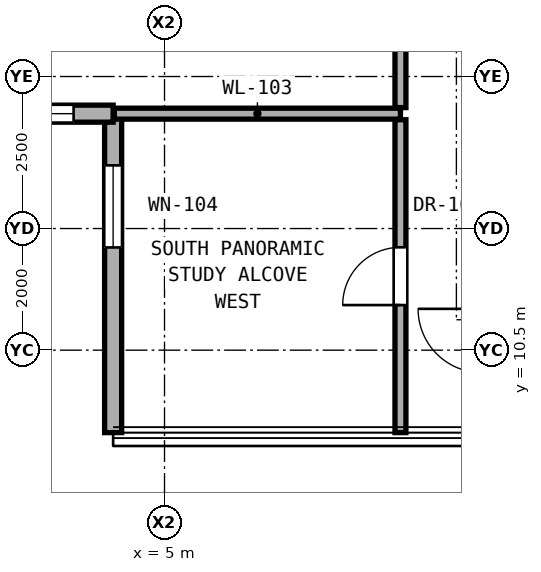
"""IFC4 building model, lengths in metres.
Left out: names, types, materials, properties, quantities, classifications, styles, units other than length and angle.
Written with IfcOpenShell. Run it as: python <this file> out.ifc"""

import sys

from ifc_helpers import new_model, si_unit, direction, frame, frame_2d, origin, place, context, subcontext, project, spatial, rectangle, extrude, element, fill, save


model = new_model("IFC4")
c1 = context("Model", 3, precision=1e-05, world=origin(), true_north=direction((0.0, 1.0)))
c2 = subcontext(c1, "Body", "Model", "MODEL_VIEW")
j1 = project(units=[si_unit("LENGTHUNIT", "METRE"), si_unit("PLANEANGLEUNIT", "RADIAN")], contexts=[c1])
p1 = place(None, origin())
s1 = spatial("IfcSite", under=j1, at=p1, CompositionType="ELEMENT")
p2 = place(p1, origin())
s2 = spatial("IfcBuilding", under=s1, at=p2, CompositionType="ELEMENT")
p3 = place(p2, frame((0.0, 0.0, 177.15)))
s3 = spatial("IfcBuildingStorey", under=s2, at=p3, CompositionType="ELEMENT", Elevation=177.15)
p4 = place(p3, frame((4.155, 14.389, 0.0), z_axis=(0.0, 0.0, 1.0), x_axis=(0.0, -1.0, 0.0)))
e1 = element("IfcWall", 1, at=p4, inside=s3, PredefinedType="SOLIDWALL", context=c2, shape_type="SweptSolid", body=[
    extrude(rectangle(XDim=5.245, YDim=0.28, at=frame_2d((2.623, 0.0))), origin(), (0.0, 0.0, 1.0), 3.03),
])
p5 = place(p4, frame((0.85, 0.0, 0.68)))
e2 = element("IfcOpeningElement", 2, at=p5, cuts=e1, PredefinedType="OPENING", context=c2, shape_type="SweptSolid", body=[
    extrude(rectangle(XDim=1.35, YDim=2.2, at=frame_2d((0.675, 1.1))), frame((0.0, 0.15, 0.0), z_axis=(0.0, -1.0, 0.0), x_axis=(1.0, 0.0, 0.0)), (0.0, 0.0, 1.0), 0.3),
])
p6 = place(p3, frame((-1.09, 14.389, 0.0), z_axis=(0.0, 0.0, 1.0), x_axis=(1.0, 0.0, 0.0)))
e3 = element("IfcWall", 3, at=p6, inside=s3, PredefinedType="SOLIDWALL", context=c2, shape_type="SweptSolid", body=[
    extrude(rectangle(XDim=5.245, YDim=0.28, at=frame_2d((2.623, 0.0))), origin(), (0.0, 0.0, 1.0), 3.03),
])
p7 = place(p6, frame((3.495, 0.0, 0.85)))
e4 = element("IfcOpeningElement", 4, at=p7, cuts=e3, PredefinedType="OPENING", context=c2, shape_type="SweptSolid", body=[
    extrude(rectangle(XDim=1.1, YDim=2.0, at=frame_2d((0.55, 1.0))), frame((0.0, 0.15, 0.0), z_axis=(0.0, -1.0, 0.0), x_axis=(1.0, 0.0, 0.0)), (0.0, 0.0, 1.0), 0.3),
])
p8 = place(p3, frame((4.175, 14.389, 0.0), z_axis=(0.0, 0.0, 1.0), x_axis=(1.0, 0.0, 0.0)))
e5 = element("IfcWall", 5, at=p8, inside=s3, PredefinedType="PARTITIONING", context=c2, shape_type="SweptSolid", body=[
    extrude(rectangle(XDim=4.705, YDim=0.18, at=frame_2d((2.353, 0.0))), origin(), (0.0, 0.0, 1.0), 3.05),
])
p9 = place(p3, frame((8.88, 9.144, 0.0), z_axis=(0.0, 0.0, 1.0), x_axis=(0.0, 1.0, 0.0)))
e6 = element("IfcWall", 6, at=p9, inside=s3, PredefinedType="PARTITIONING", context=c2, shape_type="SweptSolid", body=[
    extrude(rectangle(XDim=5.145, YDim=0.18, at=frame_2d((2.573, 0.0))), origin(), (0.0, 0.0, 1.0), 3.05),
])
p10 = place(p9, frame((2.097, 0.0, 0.0)))
e7 = element("IfcOpeningElement", 7, at=p10, cuts=e6, PredefinedType="OPENING", context=c2, shape_type="SweptSolid", body=[
    extrude(rectangle(XDim=0.95, YDim=2.15, at=frame_2d((0.475, 1.075))), frame((0.0, 0.1, 0.0), z_axis=(0.0, -1.0, 0.0), x_axis=(1.0, 0.0, 0.0)), (0.0, 0.0, 1.0), 0.2),
])
p11 = place(p3, frame((8.88, 14.489, 0.0), z_axis=(0.0, 0.0, 1.0), x_axis=(0.0, 1.0, 0.0)))
e8 = element("IfcWall", 8, at=p11, inside=s3, PredefinedType="PARTITIONING", context=c2, shape_type="SweptSolid", body=[
    extrude(rectangle(XDim=4.636, YDim=0.18, at=frame_2d((2.318, 0.0))), origin(), (0.0, 0.0, 1.0), 2.442),
])
p12 = place(p11, frame((2.093, 0.0, 0.0)))
e9 = element("IfcOpeningElement", 9, at=p12, cuts=e8, PredefinedType="OPENING", context=c2, shape_type="SweptSolid", body=[
    extrude(rectangle(XDim=1.05, YDim=2.2, at=frame_2d((0.525, 1.1))), frame((0.0, 0.1, 0.0), z_axis=(0.0, -1.0, 0.0), x_axis=(1.0, 0.0, 0.0)), (0.0, 0.0, 1.0), 0.2),
])
p13 = place(p5, origin())
e10 = element("IfcWindow", 10, at=p13, inside=s3, PartitioningType="SINGLE_PANEL", PredefinedType="WINDOW", context=c2, shape_type="SweptSolid", body=[
    extrude(rectangle(XDim=1.35, YDim=2.2, at=frame_2d((0.675, 1.1))), frame((0.0, 0.03, 0.0), z_axis=(0.0, -1.0, 0.0), x_axis=(1.0, 0.0, 0.0)), (0.0, 0.0, 1.0), 0.06),
])
fill(e2, e10)
p14 = place(p7, origin())
e11 = element("IfcWindow", 11, at=p14, inside=s3, PartitioningType="SINGLE_PANEL", PredefinedType="WINDOW", context=c2, shape_type="SweptSolid", body=[
    extrude(rectangle(XDim=1.1, YDim=2.0, at=frame_2d((0.55, 1.0))), frame((0.0, 0.03, 0.0), z_axis=(0.0, -1.0, 0.0), x_axis=(1.0, 0.0, 0.0)), (0.0, 0.0, 1.0), 0.06),
])
fill(e4, e11)
p15 = place(p10, origin())
e12 = element("IfcDoor", 12, at=p15, inside=s3, OperationType="SINGLE_SWING_LEFT", PredefinedType="DOOR", context=c2, shape_type="SweptSolid", body=[
    extrude(rectangle(XDim=0.95, YDim=2.15, at=frame_2d((0.475, 1.075))), frame((0.0, 0.025, 0.0), z_axis=(0.0, -1.0, 0.0), x_axis=(1.0, 0.0, 0.0)), (0.0, 0.0, 1.0), 0.05),
])
fill(e7, e12)
save(model, sys.argv[1])
